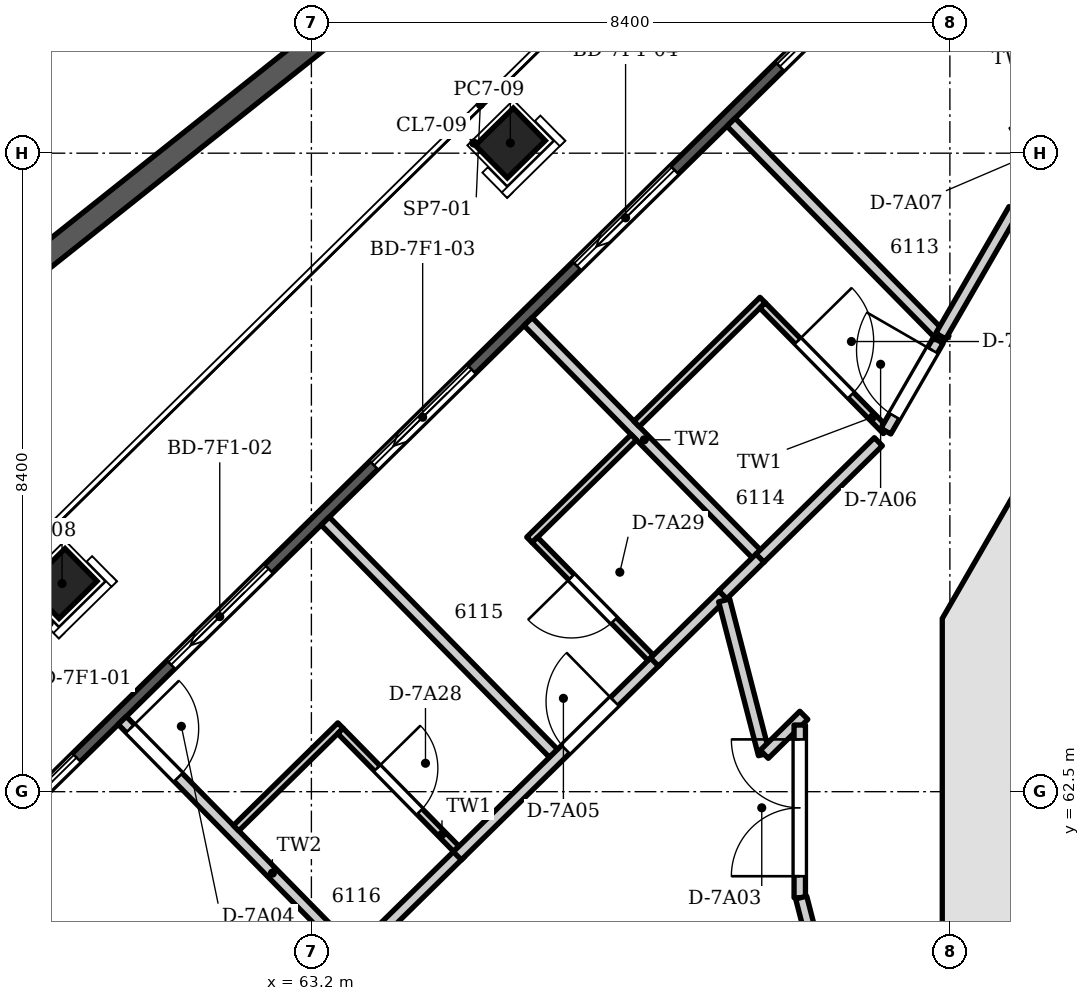
"""IFC4 building model, lengths in metres.
Left out: names, types, materials, properties, quantities, classifications, styles, units other than length and angle.
Written with IfcOpenShell. Run it as: python <this file> out.ifc"""

import sys

from ifc_helpers import new_model, si_unit, direction, frame, frame_2d, origin, origin_2d, place, context, subcontext, project, spatial, polyline, rectangle, outline, extrude, element, fill, save


model = new_model("IFC4")
c1 = context("Model", 3, precision=1e-05, world=origin(), true_north=direction((0.0, 1.0)))
c2 = subcontext(c1, "Body", "Model", "MODEL_VIEW")
j1 = project(units=[si_unit("LENGTHUNIT", "METRE"), si_unit("PLANEANGLEUNIT", "RADIAN")], contexts=[c1])
p1 = place(None, origin())
s1 = spatial("IfcSite", under=j1, at=p1, CompositionType="ELEMENT")
p2 = place(p1, origin())
s2 = spatial("IfcBuilding", under=s1, at=p2, CompositionType="ELEMENT")
p3 = place(p2, frame((0.0, 0.0, 234.9)))
s3 = spatial("IfcBuildingStorey", under=s2, at=p3, CompositionType="ELEMENT", Elevation=234.9)
p4 = place(p3, frame((74.081, 68.548, 0.0), z_axis=(0.0, 0.0, 1.0), x_axis=(-0.499983800959, -0.866034756103, 0.0)))
e1 = element("IfcWall", 1, at=p4, inside=s3, PredefinedType="SHEAR", context=c2, shape_type="SweptSolid", body=[
    extrude(outline(polyline([(0.0, -0.35), (4.555, -0.35), (4.368, 0.35), (0.188, 0.35), (0.0, -0.35)])), origin(), (0.0, 0.0, 1.0), 3.6),
])
p5 = place(p4, frame((1.077, 0.0, 0.0)))
e2 = element("IfcOpeningElement", 2, at=p5, cuts=e1, PredefinedType="OPENING", context=c2, shape_type="SweptSolid", body=[
    extrude(rectangle(XDim=2.4, YDim=2.1, at=frame_2d((1.2, 1.05))), frame((0.0, 0.36, 0.0), z_axis=(0.0, -1.0, 0.0), x_axis=(1.0, 0.0, 0.0)), (0.0, 0.0, 1.0), 0.72),
])
p6 = place(p3, frame((71.85, 64.778, 0.0), z_axis=(0.0, 0.0, 1.0), x_axis=(0.0, -1.0, 0.0)))
e3 = element("IfcWall", 3, at=p6, inside=s3, PredefinedType="SHEAR", context=c2, shape_type="SweptSolid", body=[
    extrude(outline(polyline([(0.0, -0.35), (4.555, -0.35), (4.368, 0.35), (0.188, 0.35), (0.0, -0.35)])), origin(), (0.0, 0.0, 1.0), 3.6),
])
p7 = place(p6, frame((2.992, 0.0, 0.0)))
e4 = element("IfcOpeningElement", 4, at=p7, cuts=e3, PredefinedType="OPENING", context=c2, shape_type="SweptSolid", body=[
    extrude(rectangle(XDim=0.9, YDim=2.1, at=frame_2d((0.45, 1.05))), frame((0.0, 0.36, 0.0), z_axis=(0.0, -1.0, 0.0), x_axis=(1.0, 0.0, 0.0)), (0.0, 0.0, 1.0), 0.72),
])
p8 = place(p3, frame((78.2, 63.28, 0.0), z_axis=(0.0, 0.0, 1.0), x_axis=(-0.866009627307, -0.500027324665, 0.0)))
e5 = element("IfcWall", 5, at=p8, inside=s3, PredefinedType="SHEAR", context=c2, shape_type="SweptSolid", body=[
    extrude(rectangle(XDim=6.632, YDim=0.3, at=frame_2d((3.316, 0.0))), origin(), (0.0, 0.0, 1.0), 3.6),
])
for number, where, z_axis, x_axis in (
    (6, (59.919, 65.238, -0.35), (0.0, 0.0, 1.0), (0.713, 0.701, 0.0)),
    (7, (65.817, 71.034, -0.35), (0.0, 0.0, 1.0), (0.713, 0.701, 0.0)),
):
    element("IfcColumn", number, at=place(p3, frame(where, z_axis=z_axis, x_axis=x_axis)), inside=s3, PredefinedType="COLUMN", context=c2, shape_type="SweptSolid", body=[
        extrude(rectangle(XDim=0.7, YDim=0.6, at=origin_2d()), origin(), (0.0, 0.0, 1.0), 3.95),
    ])
p9 = place(p3, frame((57.99, 60.867, 0.0), z_axis=(0.0, 0.0, 1.0), x_axis=(0.713254682671, 0.700904956216, 0.0)))
e8 = element("IfcWall", 8, at=p9, inside=s3, PredefinedType="SOLIDWALL", context=c2, shape_type="SweptSolid", body=[
    extrude(outline(polyline([(0.149, 0.075), (0.149, -0.075), (33.537, -0.075), (33.537, 0.075), (0.149, 0.075)])), origin(), (0.0, 0.0, 1.0), 3.3),
])
p10 = place(p9, frame((1.171, 0.0, 0.0)))
e9 = element("IfcOpeningElement", 9, at=p10, cuts=e8, PredefinedType="OPENING", context=c2, shape_type="SweptSolid", body=[
    extrude(rectangle(XDim=1.8, YDim=2.6, at=frame_2d((0.9, 1.3))), frame((0.0, 0.085, 0.0), z_axis=(0.0, -1.0, 0.0), x_axis=(1.0, 0.0, 0.0)), (0.0, 0.0, 1.0), 0.17),
])
p11 = place(p9, frame((4.714, 0.0, 0.0)))
e10 = element("IfcOpeningElement", 10, at=p11, cuts=e8, PredefinedType="OPENING", context=c2, shape_type="SweptSolid", body=[
    extrude(rectangle(XDim=1.8, YDim=2.6, at=frame_2d((0.9, 1.3))), frame((0.0, 0.085, 0.0), z_axis=(0.0, -1.0, 0.0), x_axis=(1.0, 0.0, 0.0)), (0.0, 0.0, 1.0), 0.17),
])
p12 = place(p9, frame((8.457, 0.0, 0.0)))
e11 = element("IfcOpeningElement", 11, at=p12, cuts=e8, PredefinedType="OPENING", context=c2, shape_type="SweptSolid", body=[
    extrude(rectangle(XDim=1.8, YDim=2.6, at=frame_2d((0.9, 1.3))), frame((0.0, 0.085, 0.0), z_axis=(0.0, -1.0, 0.0), x_axis=(1.0, 0.0, 0.0)), (0.0, 0.0, 1.0), 0.17),
])
p13 = place(p9, frame((12.2, 0.0, 0.0)))
e12 = element("IfcOpeningElement", 12, at=p13, cuts=e8, PredefinedType="OPENING", context=c2, shape_type="SweptSolid", body=[
    extrude(rectangle(XDim=1.8, YDim=2.6, at=frame_2d((0.9, 1.3))), frame((0.0, 0.085, 0.0), z_axis=(0.0, -1.0, 0.0), x_axis=(1.0, 0.0, 0.0)), (0.0, 0.0, 1.0), 0.17),
])
p14 = place(p9, frame((15.943, 0.0, 0.0)))
e13 = element("IfcOpeningElement", 13, at=p14, cuts=e8, PredefinedType="OPENING", context=c2, shape_type="SweptSolid", body=[
    extrude(rectangle(XDim=1.8, YDim=2.6, at=frame_2d((0.9, 1.3))), frame((0.0, 0.085, 0.0), z_axis=(0.0, -1.0, 0.0), x_axis=(1.0, 0.0, 0.0)), (0.0, 0.0, 1.0), 0.17),
])
p15 = place(p9, frame((19.686, 0.0, 0.0)))
e14 = element("IfcOpeningElement", 14, at=p15, cuts=e8, PredefinedType="OPENING", context=c2, shape_type="SweptSolid", body=[
    extrude(rectangle(XDim=1.8, YDim=2.6, at=frame_2d((0.9, 1.3))), frame((0.0, 0.085, 0.0), z_axis=(0.0, -1.0, 0.0), x_axis=(1.0, 0.0, 0.0)), (0.0, 0.0, 1.0), 0.17),
])
p16 = place(p9, frame((23.429, 0.0, 0.0)))
e15 = element("IfcOpeningElement", 15, at=p16, cuts=e8, PredefinedType="OPENING", context=c2, shape_type="SweptSolid", body=[
    extrude(rectangle(XDim=1.8, YDim=2.6, at=frame_2d((0.9, 1.3))), frame((0.0, 0.085, 0.0), z_axis=(0.0, -1.0, 0.0), x_axis=(1.0, 0.0, 0.0)), (0.0, 0.0, 1.0), 0.17),
])
p17 = place(p9, frame((27.172, 0.0, 0.0)))
e16 = element("IfcOpeningElement", 16, at=p17, cuts=e8, PredefinedType="OPENING", context=c2, shape_type="SweptSolid", body=[
    extrude(rectangle(XDim=1.8, YDim=2.6, at=frame_2d((0.9, 1.3))), frame((0.0, 0.085, 0.0), z_axis=(0.0, -1.0, 0.0), x_axis=(1.0, 0.0, 0.0)), (0.0, 0.0, 1.0), 0.17),
])
p18 = place(p9, frame((30.715, 0.0, 0.0)))
e17 = element("IfcOpeningElement", 17, at=p18, cuts=e8, PredefinedType="OPENING", context=c2, shape_type="SweptSolid", body=[
    extrude(rectangle(XDim=1.8, YDim=2.6, at=frame_2d((0.9, 1.3))), frame((0.0, 0.085, 0.0), z_axis=(0.0, -1.0, 0.0), x_axis=(1.0, 0.0, 0.0)), (0.0, 0.0, 1.0), 0.17),
])
p19 = place(p3, origin())
e18 = element("IfcWall", 18, at=p19, inside=s3, PredefinedType="PARAPET", context=c2, shape_type="SweptSolid", body=[
    extrude(outline(polyline([(80.313, 86.12), (49.243, 61.406), (49.565, 61.279), (78.266, 84.108), (80.313, 86.12)])), origin(), (0.0, 0.0, 1.0), 1.1),
])
p20 = place(p3, frame((60.712, 63.438, 0.0), z_axis=(0.0, 0.0, 1.0), x_axis=(0.700942148678, -0.713218132276, 0.0)))
e19 = element("IfcWall", 19, at=p20, inside=s3, PredefinedType="PARTITIONING", context=c2, shape_type="SweptSolid", body=[
    extrude(rectangle(XDim=4.435, YDim=0.15, at=frame_2d((2.218, 0.0))), origin(), (0.0, 0.0, 1.0), 3.3),
])
p21 = place(p20, frame((0.15, 0.0, 0.0)))
e20 = element("IfcOpeningElement", 20, at=p21, cuts=e19, PredefinedType="OPENING", context=c2, shape_type="SweptSolid", body=[
    extrude(rectangle(XDim=0.9, YDim=2.1, at=frame_2d((0.45, 1.05))), frame((0.0, 0.085, 0.0), z_axis=(0.0, -1.0, 0.0), x_axis=(1.0, 0.0, 0.0)), (0.0, 0.0, 1.0), 0.17),
])
p22 = place(p3, frame((62.209, 62.021, 0.0), z_axis=(0.0, 0.0, 1.0), x_axis=(0.713229664058, 0.70093041474, 0.0)))
e21 = element("IfcWall", 21, at=p22, inside=s3, PredefinedType="PARTITIONING", context=c2, shape_type="SweptSolid", body=[
    extrude(rectangle(XDim=1.926, YDim=0.1, at=frame_2d((0.963, 0.0))), origin(), (0.0, 0.0, 1.0), 3.3),
])
p23 = place(p3, frame((63.382, 66.061, 0.0), z_axis=(0.0, 0.0, 1.0), x_axis=(0.70092652961, -0.71323348217, 0.0)))
e22 = element("IfcWall", 22, at=p23, inside=s3, PredefinedType="PARTITIONING", context=c2, shape_type="SweptSolid", body=[
    extrude(rectangle(XDim=4.285, YDim=0.15, at=frame_2d((2.143, 0.0))), origin(), (0.0, 0.0, 1.0), 3.3),
])
p24 = place(p3, frame((63.582, 63.299, 0.0), z_axis=(0.0, 0.0, 1.0), x_axis=(0.700793702446, -0.713363993073, 0.0)))
e23 = element("IfcWall", 23, at=p24, inside=s3, PredefinedType="PARTITIONING", context=c2, shape_type="SweptSolid", body=[
    extrude(rectangle(XDim=2.175, YDim=0.1, at=frame_2d((1.088, 0.0))), origin(), (0.0, 0.0, 1.0), 3.3),
])
p25 = place(p24, frame((0.688, 0.0, 0.0)))
e24 = element("IfcOpeningElement", 24, at=p25, cuts=e23, PredefinedType="OPENING", context=c2, shape_type="SweptSolid", body=[
    extrude(rectangle(XDim=0.8, YDim=2.1, at=frame_2d((0.4, 1.05))), frame((0.0, 0.06, 0.0), z_axis=(0.0, -1.0, 0.0), x_axis=(1.0, 0.0, 0.0)), (0.0, 0.0, 1.0), 0.12),
])
p26 = place(p3, frame((63.822, 60.381, 0.0), z_axis=(0.0, 0.0, 1.0), x_axis=(0.713509638131, 0.700645414096, 0.0)))
e25 = element("IfcWall", 25, at=p26, inside=s3, PredefinedType="PARTITIONING", context=c2, shape_type="SweptSolid", body=[
    extrude(rectangle(XDim=1.879, YDim=0.15, at=frame_2d((0.939, 0.0))), origin(), (0.0, 0.0, 1.0), 3.3),
])
p27 = place(p3, frame((65.12, 61.656, 0.0), z_axis=(0.0, 0.0, 1.0), x_axis=(0.713194386998, 0.700966309001, 0.0)))
e26 = element("IfcWall", 26, at=p27, inside=s3, PredefinedType="PARTITIONING", context=c2, shape_type="SweptSolid", body=[
    extrude(rectangle(XDim=3.694, YDim=0.15, at=frame_2d((1.847, 0.0))), origin(), (0.0, 0.0, 1.0), 3.3),
])
p28 = place(p27, frame((1.998, 0.0, 0.0)))
e27 = element("IfcOpeningElement", 27, at=p28, cuts=e26, PredefinedType="OPENING", context=c2, shape_type="SweptSolid", body=[
    extrude(rectangle(XDim=0.9, YDim=2.1, at=frame_2d((0.45, 1.05))), frame((0.0, 0.085, 0.0), z_axis=(0.0, -1.0, 0.0), x_axis=(1.0, 0.0, 0.0)), (0.0, 0.0, 1.0), 0.17),
])
p29 = place(p3, frame((66.051, 68.685, 0.0), z_axis=(0.0, 0.0, 1.0), x_axis=(0.700808262034, -0.713349689748, 0.0)))
e28 = element("IfcWall", 28, at=p29, inside=s3, PredefinedType="PARTITIONING", context=c2, shape_type="SweptSolid", body=[
    extrude(rectangle(XDim=4.361, YDim=0.15, at=frame_2d((2.18, 0.0))), origin(), (0.0, 0.0, 1.0), 3.3),
])
p30 = place(p3, frame((66.068, 65.813, 0.0), z_axis=(0.0, 0.0, 1.0), x_axis=(0.713230757354, 0.700929302258, 0.0)))
e29 = element("IfcWall", 29, at=p30, inside=s3, PredefinedType="PARTITIONING", context=c2, shape_type="SweptSolid", body=[
    extrude(rectangle(XDim=1.925, YDim=0.1, at=frame_2d((0.962, 0.0))), origin(), (0.0, 0.0, 1.0), 3.3),
])
p31 = place(p3, frame((66.139, 65.812, 0.0), z_axis=(0.0, 0.0, 1.0), x_axis=(0.701018173636, -0.713143407901, 0.0)))
e30 = element("IfcWall", 30, at=p31, inside=s3, PredefinedType="PARTITIONING", context=c2, shape_type="SweptSolid", body=[
    extrude(rectangle(XDim=2.175, YDim=0.1, at=frame_2d((1.087, 0.0))), origin(), (0.0, 0.0, 1.0), 3.3),
])
p32 = place(p31, frame((0.687, 0.0, 0.0)))
e31 = element("IfcOpeningElement", 31, at=p32, cuts=e30, PredefinedType="OPENING", context=c2, shape_type="SweptSolid", body=[
    extrude(rectangle(XDim=0.8, YDim=2.1, at=frame_2d((0.4, 1.05))), frame((0.0, 0.06, 0.0), z_axis=(0.0, -1.0, 0.0), x_axis=(1.0, 0.0, 0.0)), (0.0, 0.0, 1.0), 0.12),
])
p33 = place(p3, frame((67.479, 67.339, 0.0), z_axis=(0.0, 0.0, 1.0), x_axis=(0.713275639023, 0.700883629982, 0.0)))
e32 = element("IfcWall", 32, at=p33, inside=s3, PredefinedType="PARTITIONING", context=c2, shape_type="SweptSolid", body=[
    extrude(rectangle(XDim=2.325, YDim=0.1, at=frame_2d((1.162, 0.0))), origin(), (0.0, 0.0, 1.0), 3.3),
])
p34 = place(p3, frame((67.714, 64.205, 0.0), z_axis=(0.0, 0.0, 1.0), x_axis=(0.712981774693, 0.70118256464, 0.0)))
e33 = element("IfcWall", 33, at=p34, inside=s3, PredefinedType="PARTITIONING", context=c2, shape_type="SweptSolid", body=[
    extrude(rectangle(XDim=1.262, YDim=0.15, at=frame_2d((0.631, 0.0))), origin(), (0.0, 0.0, 1.0), 3.3),
])
p35 = place(p3, frame((68.631, 65.016, 0.0), z_axis=(0.0, 0.0, 1.0), x_axis=(0.250220542644, -0.968188865893, 0.0)))
e34 = element("IfcWall", 34, at=p35, inside=s3, PredefinedType="PARTITIONING", context=c2, shape_type="SweptSolid", body=[
    extrude(rectangle(XDim=2.091, YDim=0.15, at=frame_2d((1.045, 0.0))), origin(), (0.0, 0.0, 1.0), 3.3),
])
p36 = place(p3, frame((68.612, 65.091, 0.0), z_axis=(0.0, 0.0, 1.0), x_axis=(0.712699057128, 0.701469923781, 0.0)))
e35 = element("IfcWall", 35, at=p36, inside=s3, PredefinedType="PARTITIONING", context=c2, shape_type="SweptSolid", body=[
    extrude(rectangle(XDim=0.696, YDim=0.15, at=frame_2d((0.348, 0.0))), origin(), (0.0, 0.0, 1.0), 3.3),
])
p37 = place(p3, frame((68.721, 71.308, 0.0), z_axis=(0.0, 0.0, 1.0), x_axis=(0.700815785944, -0.713342298039, 0.0)))
e36 = element("IfcWall", 36, at=p37, inside=s3, PredefinedType="PARTITIONING", context=c2, shape_type="SweptSolid", body=[
    extrude(rectangle(XDim=4.015, YDim=0.15, at=frame_2d((2.007, 0.0))), origin(), (0.0, 0.0, 1.0), 3.3),
])
p38 = place(p3, frame((69.136, 68.897, 0.0), z_axis=(0.0, 0.0, 1.0), x_axis=(0.701179250169, -0.712985034297, 0.0)))
e37 = element("IfcWall", 37, at=p38, inside=s3, PredefinedType="PARTITIONING", context=c2, shape_type="SweptSolid", body=[
    extrude(rectangle(XDim=2.316, YDim=0.1, at=frame_2d((1.158, 0.0))), origin(), (0.0, 0.0, 1.0), 3.3),
])
p39 = place(p38, frame((0.658, 0.0, 0.0)))
e38 = element("IfcOpeningElement", 38, at=p39, cuts=e37, PredefinedType="OPENING", context=c2, shape_type="SweptSolid", body=[
    extrude(rectangle(XDim=1.0, YDim=2.1, at=frame_2d((0.5, 1.05))), frame((0.0, 0.06, 0.0), z_axis=(0.0, -1.0, 0.0), x_axis=(1.0, 0.0, 0.0)), (0.0, 0.0, 1.0), 0.12),
])
p40 = place(p3, frame((69.102, 65.573, 0.0), z_axis=(0.0, 0.0, 1.0), x_axis=(0.713007842216, 0.701156057478, 0.0)))
e39 = element("IfcWall", 39, at=p40, inside=s3, PredefinedType="PARTITIONING", context=c2, shape_type="SweptSolid", body=[
    extrude(rectangle(XDim=2.184, YDim=0.15, at=frame_2d((1.092, 0.0))), origin(), (0.0, 0.0, 1.0), 3.3),
])
p41 = place(p3, frame((69.158, 62.992, 0.0), z_axis=(0.0, 0.0, 1.0), x_axis=(0.712433157826, 0.701739977221, 0.0)))
e40 = element("IfcWall", 40, at=p41, inside=s3, PredefinedType="PARTITIONING", context=c2, shape_type="SweptSolid", body=[
    extrude(rectangle(XDim=0.731, YDim=0.15, at=frame_2d((0.365, 0.0))), origin(), (0.0, 0.0, 1.0), 3.3),
])
p42 = place(p3, frame((69.625, 61.105, 0.0), z_axis=(0.0, 0.0, 1.0), x_axis=(0.0, 1.0, 0.0)))
e41 = element("IfcWall", 41, at=p42, inside=s3, PredefinedType="PARTITIONING", context=c2, shape_type="SweptSolid", body=[
    extrude(rectangle(XDim=2.272, YDim=0.15, at=frame_2d((1.136, 0.0))), origin(), (0.0, 0.0, 1.0), 3.3),
])
p43 = place(p42, frame((0.283, 0.0, 0.0)))
e42 = element("IfcOpeningElement", 42, at=p43, cuts=e41, PredefinedType="OPENING", context=c2, shape_type="SweptSolid", body=[
    extrude(rectangle(XDim=1.8, YDim=2.1, at=frame_2d((0.9, 1.05))), frame((0.0, 0.085, 0.0), z_axis=(0.0, -1.0, 0.0), x_axis=(1.0, 0.0, 0.0)), (0.0, 0.0, 1.0), 0.17),
])
p44 = place(p3, frame((69.644, 61.107, 0.0), z_axis=(0.0, 0.0, 1.0), x_axis=(0.249991617467, -0.968248000874, 0.0)))
e43 = element("IfcWall", 43, at=p44, inside=s3, PredefinedType="PARTITIONING", context=c2, shape_type="SweptSolid", body=[
    extrude(rectangle(XDim=1.17, YDim=0.15, at=frame_2d((0.585, 0.0))), origin(), (0.0, 0.0, 1.0), 2.8),
])
p45 = place(p3, frame((70.758, 67.243, 0.0), z_axis=(0.0, 0.0, 1.0), x_axis=(0.49979916758, 0.866141323391, 0.0)))
e44 = element("IfcWall", 44, at=p45, inside=s3, PredefinedType="PARTITIONING", context=c2, shape_type="SweptSolid", body=[
    extrude(rectangle(XDim=1.377, YDim=0.15, at=frame_2d((0.689, 0.0))), origin(), (0.0, 0.0, 1.0), 3.3),
])
p46 = place(p45, frame((0.228, 0.0, 0.0)))
e45 = element("IfcOpeningElement", 45, at=p46, cuts=e44, PredefinedType="OPENING", context=c2, shape_type="SweptSolid", body=[
    extrude(rectangle(XDim=1.0, YDim=2.1, at=frame_2d((0.5, 1.05))), frame((0.0, 0.085, 0.0), z_axis=(0.0, -1.0, 0.0), x_axis=(1.0, 0.0, 0.0)), (0.0, 0.0, 1.0), 0.17),
])
p47 = place(p3, frame((71.39, 73.931, 0.0), z_axis=(0.0, 0.0, 1.0), x_axis=(0.700963396894, -0.713197249164, 0.0)))
e46 = element("IfcWall", 46, at=p47, inside=s3, PredefinedType="PARTITIONING", context=c2, shape_type="SweptSolid", body=[
    extrude(rectangle(XDim=4.031, YDim=0.15, at=frame_2d((2.016, 0.0))), origin(), (0.0, 0.0, 1.0), 3.3),
])
p48 = place(p3, frame((71.48, 68.494, 0.0), z_axis=(0.0, 0.0, 1.0), x_axis=(0.500205717672, 0.865906600049, 0.0)))
e47 = element("IfcWall", 47, at=p48, inside=s3, PredefinedType="PARTITIONING", context=c2, shape_type="SweptSolid", body=[
    extrude(rectangle(XDim=1.924, YDim=0.15, at=frame_2d((0.962, 0.0))), origin(), (0.0, 0.0, 1.0), 3.3),
])
p49 = place(p10, origin())
e48 = element("IfcDoor", 48, at=p49, inside=s3, OperationType="SLIDING_TO_LEFT", PredefinedType="DOOR", context=c2, shape_type="SweptSolid", body=[
    extrude(rectangle(XDim=1.8, YDim=2.6, at=frame_2d((0.9, 1.3))), frame((0.0, 0.025, 0.0), z_axis=(0.0, -1.0, 0.0), x_axis=(1.0, 0.0, 0.0)), (0.0, 0.0, 1.0), 0.05),
])
fill(e9, e48)
p50 = place(p11, origin())
e49 = element("IfcDoor", 49, at=p50, inside=s3, OperationType="SLIDING_TO_LEFT", PredefinedType="DOOR", context=c2, shape_type="SweptSolid", body=[
    extrude(rectangle(XDim=1.8, YDim=2.6, at=frame_2d((0.9, 1.3))), frame((0.0, 0.025, 0.0), z_axis=(0.0, -1.0, 0.0), x_axis=(1.0, 0.0, 0.0)), (0.0, 0.0, 1.0), 0.05),
])
fill(e10, e49)
p51 = place(p12, origin())
e50 = element("IfcDoor", 50, at=p51, inside=s3, OperationType="SLIDING_TO_LEFT", PredefinedType="DOOR", context=c2, shape_type="SweptSolid", body=[
    extrude(rectangle(XDim=1.8, YDim=2.6, at=frame_2d((0.9, 1.3))), frame((0.0, 0.025, 0.0), z_axis=(0.0, -1.0, 0.0), x_axis=(1.0, 0.0, 0.0)), (0.0, 0.0, 1.0), 0.05),
])
fill(e11, e50)
p52 = place(p13, origin())
e51 = element("IfcDoor", 51, at=p52, inside=s3, OperationType="SLIDING_TO_LEFT", PredefinedType="DOOR", context=c2, shape_type="SweptSolid", body=[
    extrude(rectangle(XDim=1.8, YDim=2.6, at=frame_2d((0.9, 1.3))), frame((0.0, 0.025, 0.0), z_axis=(0.0, -1.0, 0.0), x_axis=(1.0, 0.0, 0.0)), (0.0, 0.0, 1.0), 0.05),
])
fill(e12, e51)
p53 = place(p14, origin())
e52 = element("IfcDoor", 52, at=p53, inside=s3, OperationType="SLIDING_TO_LEFT", PredefinedType="DOOR", context=c2, shape_type="SweptSolid", body=[
    extrude(rectangle(XDim=1.8, YDim=2.6, at=frame_2d((0.9, 1.3))), frame((0.0, 0.025, 0.0), z_axis=(0.0, -1.0, 0.0), x_axis=(1.0, 0.0, 0.0)), (0.0, 0.0, 1.0), 0.05),
])
fill(e13, e52)
p54 = place(p43, origin())
e53 = element("IfcDoor", 53, at=p54, inside=s3, OperationType="DOUBLE_DOOR_DOUBLE_SWING", PredefinedType="DOOR", context=c2, shape_type="SweptSolid", body=[
    extrude(rectangle(XDim=1.8, YDim=2.1, at=frame_2d((0.9, 1.05))), frame((0.0, 0.025, 0.0), z_axis=(0.0, -1.0, 0.0), x_axis=(1.0, 0.0, 0.0)), (0.0, 0.0, 1.0), 0.05),
])
fill(e42, e53)
p55 = place(p21, origin())
e54 = element("IfcDoor", 54, at=p55, inside=s3, OperationType="SINGLE_SWING_LEFT", PredefinedType="DOOR", context=c2, shape_type="SweptSolid", body=[
    extrude(rectangle(XDim=0.9, YDim=2.1, at=frame_2d((0.45, 1.05))), frame((0.0, 0.025, 0.0), z_axis=(0.0, -1.0, 0.0), x_axis=(1.0, 0.0, 0.0)), (0.0, 0.0, 1.0), 0.05),
])
fill(e20, e54)
p56 = place(p28, origin())
e55 = element("IfcDoor", 55, at=p56, inside=s3, OperationType="SINGLE_SWING_RIGHT", PredefinedType="DOOR", context=c2, shape_type="SweptSolid", body=[
    extrude(rectangle(XDim=0.9, YDim=2.1, at=frame_2d((0.45, 1.05))), frame((0.0, 0.025, 0.0), z_axis=(0.0, -1.0, 0.0), x_axis=(1.0, 0.0, 0.0)), (0.0, 0.0, 1.0), 0.05),
])
fill(e27, e55)
p57 = place(p46, origin())
e56 = element("IfcDoor", 56, at=p57, inside=s3, OperationType="SINGLE_SWING_RIGHT", PredefinedType="DOOR", context=c2, shape_type="SweptSolid", body=[
    extrude(rectangle(XDim=1.0, YDim=2.1, at=frame_2d((0.5, 1.05))), frame((0.0, 0.025, 0.0), z_axis=(0.0, -1.0, 0.0), x_axis=(1.0, 0.0, 0.0)), (0.0, 0.0, 1.0), 0.05),
])
fill(e45, e56)
p58 = place(p25, origin())
e57 = element("IfcDoor", 57, at=p58, inside=s3, OperationType="SINGLE_SWING_LEFT", PredefinedType="DOOR", context=c2, shape_type="SweptSolid", body=[
    extrude(rectangle(XDim=0.8, YDim=2.1, at=frame_2d((0.4, 1.05))), frame((0.0, 0.025, 0.0), z_axis=(0.0, -1.0, 0.0), x_axis=(1.0, 0.0, 0.0)), (0.0, 0.0, 1.0), 0.05),
])
fill(e24, e57)
p59 = place(p32, frame((0.8, 0.0, 0.0), z_axis=(0.0, 0.0, 1.0), x_axis=(-1.0, 0.0, 0.0)))
e58 = element("IfcDoor", 58, at=p59, inside=s3, OperationType="SINGLE_SWING_RIGHT", PredefinedType="DOOR", context=c2, shape_type="SweptSolid", body=[
    extrude(rectangle(XDim=0.8, YDim=2.1, at=frame_2d((0.4, 1.05))), frame((0.0, 0.025, 0.0), z_axis=(0.0, -1.0, 0.0), x_axis=(1.0, 0.0, 0.0)), (0.0, 0.0, 1.0), 0.05),
])
fill(e31, e58)
p60 = place(p39, origin())
e59 = element("IfcDoor", 59, at=p60, inside=s3, OperationType="SINGLE_SWING_LEFT", PredefinedType="DOOR", context=c2, shape_type="SweptSolid", body=[
    extrude(rectangle(XDim=1.0, YDim=2.1, at=frame_2d((0.5, 1.05))), frame((0.0, 0.025, 0.0), z_axis=(0.0, -1.0, 0.0), x_axis=(1.0, 0.0, 0.0)), (0.0, 0.0, 1.0), 0.05),
])
fill(e38, e59)
p61 = place(p5, origin())
e60 = element("IfcDoor", 60, at=p61, inside=s3, OperationType="DOUBLE_DOOR_SINGLE_SWING", PredefinedType="DOOR", context=c2, shape_type="SweptSolid", body=[
    extrude(rectangle(XDim=2.4, YDim=2.1, at=frame_2d((1.2, 1.05))), frame((0.0, 0.025, 0.0), z_axis=(0.0, -1.0, 0.0), x_axis=(1.0, 0.0, 0.0)), (0.0, 0.0, 1.0), 0.05),
])
fill(e2, e60)
p62 = place(p7, origin())
e61 = element("IfcDoor", 61, at=p62, inside=s3, OperationType="SINGLE_SWING_RIGHT", PredefinedType="DOOR", context=c2, shape_type="SweptSolid", body=[
    extrude(rectangle(XDim=0.9, YDim=2.1, at=frame_2d((0.45, 1.05))), frame((0.0, 0.075, 0.0), z_axis=(0.0, -1.0, 0.0), x_axis=(1.0, 0.0, 0.0)), (0.0, 0.0, 1.0), 0.05),
])
fill(e4, e61)
save(model, sys.argv[1])
